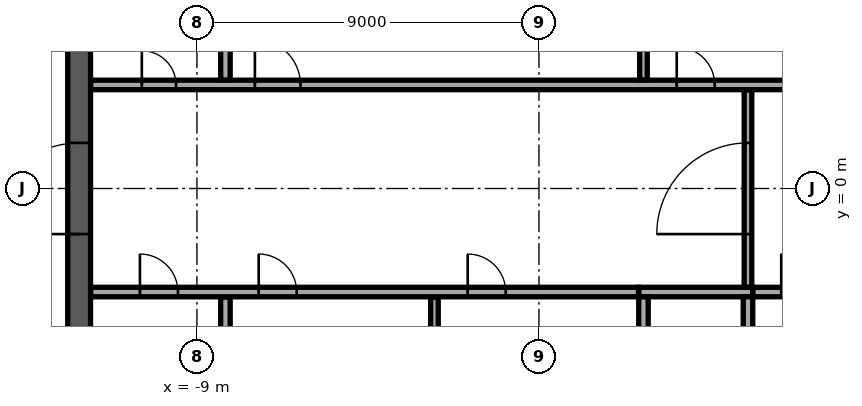
"""IFC4 building model, lengths in metres.
Left out: names, types, materials, properties, quantities, classifications, styles, units other than length and angle.
Written with IfcOpenShell. Run it as: python <this file> out.ifc"""

import sys

from ifc_helpers import new_model, si_unit, direction, frame, frame_2d, origin, place, context, subcontext, project, spatial, rectangle, extrude, element, fill, save


model = new_model("IFC4")
c1 = context("Model", 3, precision=1e-05, world=origin(), true_north=direction((0.0, 1.0)))
c2 = subcontext(c1, "Body", "Model", "MODEL_VIEW")
j1 = project(units=[si_unit("LENGTHUNIT", "METRE"), si_unit("PLANEANGLEUNIT", "RADIAN")], contexts=[c1])
p1 = place(None, origin())
s1 = spatial("IfcSite", under=j1, at=p1, CompositionType="ELEMENT")
p2 = place(p1, origin())
s2 = spatial("IfcBuilding", under=s1, at=p2, CompositionType="ELEMENT")
p3 = place(p2, frame((0.0, 0.0, 344.5)))
s3 = spatial("IfcBuildingStorey", under=s2, at=p3, CompositionType="ELEMENT", Elevation=344.5)
p4 = place(p3, frame((-12.1, -11.8, 0.0), z_axis=(0.0, 0.0, 1.0), x_axis=(0.0, 1.0, 0.0)))
e1 = element("IfcWall", 1, at=p4, inside=s3, PredefinedType="SHEAR", context=c2, shape_type="SweptSolid", body=[
    extrude(rectangle(XDim=23.6, YDim=0.6, at=frame_2d((11.8, 0.0))), origin(), (0.0, 0.0, 1.0), 5.3),
])
p5 = place(p4, frame((10.6, 0.0, 0.0)))
e2 = element("IfcOpeningElement", 2, at=p5, cuts=e1, PredefinedType="OPENING", context=c2, shape_type="SweptSolid", body=[
    extrude(rectangle(XDim=2.4, YDim=2.4, at=frame_2d((1.2, 1.2))), frame((0.0, 0.31, 0.0), z_axis=(0.0, -1.0, 0.0), x_axis=(1.0, 0.0, 0.0)), (0.0, 0.0, 1.0), 0.62),
])
p6 = place(p3, frame((2.625, -2.725, 0.0), z_axis=(0.0, 0.0, 1.0), x_axis=(1.0, 0.0, 0.0)))
e3 = element("IfcWall", 3, at=p6, inside=s3, PredefinedType="SOLIDWALL", context=c2, shape_type="SweptSolid", body=[
    extrude(rectangle(XDim=3.0, YDim=0.25, at=frame_2d((1.5, 0.0))), origin(), (0.0, 0.0, 1.0), 5.3),
])
for number, where, z_axis, x_axis in (
    (4, (2.75, -5.55, 0.0), (0.0, 0.0, 1.0), (0.0, 1.0, 0.0)),
    (5, (5.5, -5.55, 0.0), (0.0, 0.0, 1.0), (0.0, 1.0, 0.0)),
):
    element("IfcWall", number, at=place(p3, frame(where, z_axis=z_axis, x_axis=x_axis)), inside=s3, PredefinedType="SOLIDWALL", context=c2, shape_type="SweptSolid", body=[
        extrude(rectangle(XDim=2.7, YDim=0.25, at=frame_2d((1.35, 0.0))), origin(), (0.0, 0.0, 1.0), 5.3),
    ])
p7 = place(p3, frame((-8.25, -5.545, 0.0), z_axis=(0.0, 0.0, 1.0), x_axis=(0.0, 1.0, 0.0)))
e6 = element("IfcWall", 6, at=p7, inside=s3, PredefinedType="PARTITIONING", context=c2, shape_type="SweptSolid", body=[
    extrude(rectangle(XDim=2.69, YDim=0.25, at=frame_2d((1.345, 0.0))), origin(), (0.0, 0.0, 1.0), 5.3),
])
p8 = place(p3, frame((-2.75, -5.545, 0.0), z_axis=(0.0, 0.0, 1.0), x_axis=(0.0, 1.0, 0.0)))
e7 = element("IfcWall", 7, at=p8, inside=s3, PredefinedType="PARTITIONING", context=c2, shape_type="SweptSolid", body=[
    extrude(rectangle(XDim=2.69, YDim=0.2, at=frame_2d((1.345, 0.0))), origin(), (0.0, 0.0, 1.0), 5.3),
])
p9 = place(p3, frame((-11.795, -2.725, 0.0), z_axis=(0.0, 0.0, 1.0), x_axis=(1.0, 0.0, 0.0)))
e8 = element("IfcWall", 8, at=p9, inside=s3, PredefinedType="PARTITIONING", context=c2, shape_type="SweptSolid", body=[
    extrude(rectangle(XDim=14.415, YDim=0.25, at=frame_2d((7.208, 0.0))), origin(), (0.0, 0.0, 1.0), 5.3),
])
p10 = place(p9, frame((1.295, 0.0, 0.0)))
e9 = element("IfcOpeningElement", 9, at=p10, cuts=e8, PredefinedType="OPENING", context=c2, shape_type="SweptSolid", body=[
    extrude(rectangle(XDim=1.0, YDim=2.1, at=frame_2d((0.5, 1.05))), frame((0.0, 0.135, 0.0), z_axis=(0.0, -1.0, 0.0), x_axis=(1.0, 0.0, 0.0)), (0.0, 0.0, 1.0), 0.27),
])
p11 = place(p9, frame((4.42, 0.0, 0.0)))
e10 = element("IfcOpeningElement", 10, at=p11, cuts=e8, PredefinedType="OPENING", context=c2, shape_type="SweptSolid", body=[
    extrude(rectangle(XDim=1.0, YDim=2.1, at=frame_2d((0.5, 1.05))), frame((0.0, 0.135, 0.0), z_axis=(0.0, -1.0, 0.0), x_axis=(1.0, 0.0, 0.0)), (0.0, 0.0, 1.0), 0.27),
])
p12 = place(p9, frame((9.92, 0.0, 0.0)))
e11 = element("IfcOpeningElement", 11, at=p12, cuts=e8, PredefinedType="OPENING", context=c2, shape_type="SweptSolid", body=[
    extrude(rectangle(XDim=1.0, YDim=2.1, at=frame_2d((0.5, 1.05))), frame((0.0, 0.135, 0.0), z_axis=(0.0, -1.0, 0.0), x_axis=(1.0, 0.0, 0.0)), (0.0, 0.0, 1.0), 0.27),
])
p13 = place(p3, frame((5.63, -2.725, 0.0), z_axis=(0.0, 0.0, 1.0), x_axis=(1.0, 0.0, 0.0)))
e12 = element("IfcWall", 12, at=p13, inside=s3, PredefinedType="PARTITIONING", context=c2, shape_type="SweptSolid", body=[
    extrude(rectangle(XDim=6.165, YDim=0.25, at=frame_2d((3.083, 0.0))), origin(), (0.0, 0.0, 1.0), 5.3),
])
p14 = place(p13, frame((0.745, 0.0, 0.0)))
e13 = element("IfcOpeningElement", 13, at=p14, cuts=e12, PredefinedType="OPENING", context=c2, shape_type="SweptSolid", body=[
    extrude(rectangle(XDim=1.0, YDim=2.1, at=frame_2d((0.5, 1.05))), frame((0.0, 0.135, 0.0), z_axis=(0.0, -1.0, 0.0), x_axis=(1.0, 0.0, 0.0)), (0.0, 0.0, 1.0), 0.27),
])
p15 = place(p13, frame((3.92, 0.0, 0.0)))
e14 = element("IfcOpeningElement", 14, at=p15, cuts=e12, PredefinedType="OPENING", context=c2, shape_type="SweptSolid", body=[
    extrude(rectangle(XDim=0.9, YDim=2.1, at=frame_2d((0.45, 1.05))), frame((0.0, 0.135, 0.0), z_axis=(0.0, -1.0, 0.0), x_axis=(1.0, 0.0, 0.0)), (0.0, 0.0, 1.0), 0.27),
])
p16 = place(p3, frame((5.5, -2.595, 0.0), z_axis=(0.0, 0.0, 1.0), x_axis=(0.0, 1.0, 0.0)))
e15 = element("IfcWall", 15, at=p16, inside=s3, PredefinedType="PARTITIONING", context=c2, shape_type="SweptSolid", body=[
    extrude(rectangle(XDim=5.19, YDim=0.2, at=frame_2d((2.595, 0.0))), origin(), (0.0, 0.0, 1.0), 5.3),
])
p17 = place(p16, frame((1.395, 0.0, 0.0)))
e16 = element("IfcOpeningElement", 16, at=p17, cuts=e15, PredefinedType="OPENING", context=c2, shape_type="SweptSolid", body=[
    extrude(rectangle(XDim=2.4, YDim=2.4, at=frame_2d((1.2, 1.2))), frame((0.0, 0.11, 0.0), z_axis=(0.0, -1.0, 0.0), x_axis=(1.0, 0.0, 0.0)), (0.0, 0.0, 1.0), 0.22),
])
p18 = place(p3, frame((-11.795, 2.725, 0.0), z_axis=(0.0, 0.0, 1.0), x_axis=(1.0, 0.0, 0.0)))
e17 = element("IfcWall", 17, at=p18, inside=s3, PredefinedType="PARTITIONING", context=c2, shape_type="SweptSolid", body=[
    extrude(rectangle(XDim=23.59, YDim=0.25, at=frame_2d((11.795, 0.0))), origin(), (0.0, 0.0, 1.0), 5.3),
])
p19 = place(p18, frame((21.345, 0.0, 0.0)))
e18 = element("IfcOpeningElement", 18, at=p19, cuts=e17, PredefinedType="OPENING", context=c2, shape_type="SweptSolid", body=[
    extrude(rectangle(XDim=0.9, YDim=2.1, at=frame_2d((0.45, 1.05))), frame((0.0, 0.135, 0.0), z_axis=(0.0, -1.0, 0.0), x_axis=(1.0, 0.0, 0.0)), (0.0, 0.0, 1.0), 0.27),
])
p20 = place(p18, frame((1.345, 0.0, 0.0)))
e19 = element("IfcOpeningElement", 19, at=p20, cuts=e17, PredefinedType="OPENING", context=c2, shape_type="SweptSolid", body=[
    extrude(rectangle(XDim=0.9, YDim=2.1, at=frame_2d((0.45, 1.05))), frame((0.0, 0.135, 0.0), z_axis=(0.0, -1.0, 0.0), x_axis=(1.0, 0.0, 0.0)), (0.0, 0.0, 1.0), 0.27),
])
p21 = place(p18, frame((4.32, 0.0, 0.0)))
e20 = element("IfcOpeningElement", 20, at=p21, cuts=e17, PredefinedType="OPENING", context=c2, shape_type="SweptSolid", body=[
    extrude(rectangle(XDim=1.2, YDim=2.1, at=frame_2d((0.6, 1.05))), frame((0.0, 0.135, 0.0), z_axis=(0.0, -1.0, 0.0), x_axis=(1.0, 0.0, 0.0)), (0.0, 0.0, 1.0), 0.27),
])
p22 = place(p18, frame((15.42, 0.0, 0.0)))
e21 = element("IfcOpeningElement", 21, at=p22, cuts=e17, PredefinedType="OPENING", context=c2, shape_type="SweptSolid", body=[
    extrude(rectangle(XDim=1.0, YDim=2.1, at=frame_2d((0.5, 1.05))), frame((0.0, 0.135, 0.0), z_axis=(0.0, -1.0, 0.0), x_axis=(1.0, 0.0, 0.0)), (0.0, 0.0, 1.0), 0.27),
])
p23 = place(p3, frame((-8.25, 2.855, 0.0), z_axis=(0.0, 0.0, 1.0), x_axis=(0.0, 1.0, 0.0)))
e22 = element("IfcWall", 22, at=p23, inside=s3, PredefinedType="PARTITIONING", context=c2, shape_type="SweptSolid", body=[
    extrude(rectangle(XDim=1.715, YDim=0.25, at=frame_2d((0.857, 0.0))), origin(), (0.0, 0.0, 1.0), 5.3),
])
p24 = place(p3, frame((2.75, 2.855, 0.0), z_axis=(0.0, 0.0, 1.0), x_axis=(0.0, 1.0, 0.0)))
e23 = element("IfcWall", 23, at=p24, inside=s3, PredefinedType="PARTITIONING", context=c2, shape_type="SweptSolid", body=[
    extrude(rectangle(XDim=2.69, YDim=0.2, at=frame_2d((1.345, 0.0))), origin(), (0.0, 0.0, 1.0), 5.3),
])
p25 = place(p5, origin())
e24 = element("IfcDoor", 24, at=p25, inside=s3, OperationType="SINGLE_SWING_LEFT", PredefinedType="DOOR", context=c2, shape_type="SweptSolid", body=[
    extrude(rectangle(XDim=2.4, YDim=2.4, at=frame_2d((1.2, 1.2))), frame((0.0, 0.025, 0.0), z_axis=(0.0, -1.0, 0.0), x_axis=(1.0, 0.0, 0.0)), (0.0, 0.0, 1.0), 0.05),
])
fill(e2, e24)
p26 = place(p10, origin())
e25 = element("IfcDoor", 25, at=p26, inside=s3, OperationType="SINGLE_SWING_LEFT", PredefinedType="DOOR", context=c2, shape_type="SweptSolid", body=[
    extrude(rectangle(XDim=1.0, YDim=2.1, at=frame_2d((0.5, 1.05))), frame((0.0, 0.025, 0.0), z_axis=(0.0, -1.0, 0.0), x_axis=(1.0, 0.0, 0.0)), (0.0, 0.0, 1.0), 0.05),
])
fill(e9, e25)
p27 = place(p14, origin())
e26 = element("IfcDoor", 26, at=p27, inside=s3, OperationType="SINGLE_SWING_LEFT", PredefinedType="DOOR", context=c2, shape_type="SweptSolid", body=[
    extrude(rectangle(XDim=1.0, YDim=2.1, at=frame_2d((0.5, 1.05))), frame((0.0, 0.025, 0.0), z_axis=(0.0, -1.0, 0.0), x_axis=(1.0, 0.0, 0.0)), (0.0, 0.0, 1.0), 0.05),
])
fill(e13, e26)
p28 = place(p20, origin())
e27 = element("IfcDoor", 27, at=p28, inside=s3, OperationType="SINGLE_SWING_LEFT", PredefinedType="DOOR", context=c2, shape_type="SweptSolid", body=[
    extrude(rectangle(XDim=0.9, YDim=2.1, at=frame_2d((0.45, 1.05))), frame((0.0, 0.025, 0.0), z_axis=(0.0, -1.0, 0.0), x_axis=(1.0, 0.0, 0.0)), (0.0, 0.0, 1.0), 0.05),
])
fill(e19, e27)
p29 = place(p21, origin())
e28 = element("IfcDoor", 28, at=p29, inside=s3, OperationType="SINGLE_SWING_LEFT", PredefinedType="DOOR", context=c2, shape_type="SweptSolid", body=[
    extrude(rectangle(XDim=1.2, YDim=2.1, at=frame_2d((0.6, 1.05))), frame((0.0, 0.025, 0.0), z_axis=(0.0, -1.0, 0.0), x_axis=(1.0, 0.0, 0.0)), (0.0, 0.0, 1.0), 0.05),
])
fill(e20, e28)
p30 = place(p22, origin())
e29 = element("IfcDoor", 29, at=p30, inside=s3, OperationType="SINGLE_SWING_LEFT", PredefinedType="DOOR", context=c2, shape_type="SweptSolid", body=[
    extrude(rectangle(XDim=1.0, YDim=2.1, at=frame_2d((0.5, 1.05))), frame((0.0, 0.025, 0.0), z_axis=(0.0, -1.0, 0.0), x_axis=(1.0, 0.0, 0.0)), (0.0, 0.0, 1.0), 0.05),
])
fill(e21, e29)
p31 = place(p11, origin())
e30 = element("IfcDoor", 30, at=p31, inside=s3, OperationType="SINGLE_SWING_LEFT", PredefinedType="DOOR", context=c2, shape_type="SweptSolid", body=[
    extrude(rectangle(XDim=1.0, YDim=2.1, at=frame_2d((0.5, 1.05))), frame((0.0, 0.025, 0.0), z_axis=(0.0, -1.0, 0.0), x_axis=(1.0, 0.0, 0.0)), (0.0, 0.0, 1.0), 0.05),
])
fill(e10, e30)
p32 = place(p12, origin())
e31 = element("IfcDoor", 31, at=p32, inside=s3, OperationType="SINGLE_SWING_LEFT", PredefinedType="DOOR", context=c2, shape_type="SweptSolid", body=[
    extrude(rectangle(XDim=1.0, YDim=2.1, at=frame_2d((0.5, 1.05))), frame((0.0, 0.025, 0.0), z_axis=(0.0, -1.0, 0.0), x_axis=(1.0, 0.0, 0.0)), (0.0, 0.0, 1.0), 0.05),
])
fill(e11, e31)
p33 = place(p17, origin())
e32 = element("IfcDoor", 32, at=p33, inside=s3, OperationType="SINGLE_SWING_LEFT", PredefinedType="DOOR", context=c2, shape_type="SweptSolid", body=[
    extrude(rectangle(XDim=2.4, YDim=2.4, at=frame_2d((1.2, 1.2))), frame((0.0, 0.025, 0.0), z_axis=(0.0, -1.0, 0.0), x_axis=(1.0, 0.0, 0.0)), (0.0, 0.0, 1.0), 0.05),
])
fill(e16, e32)
save(model, sys.argv[1])
